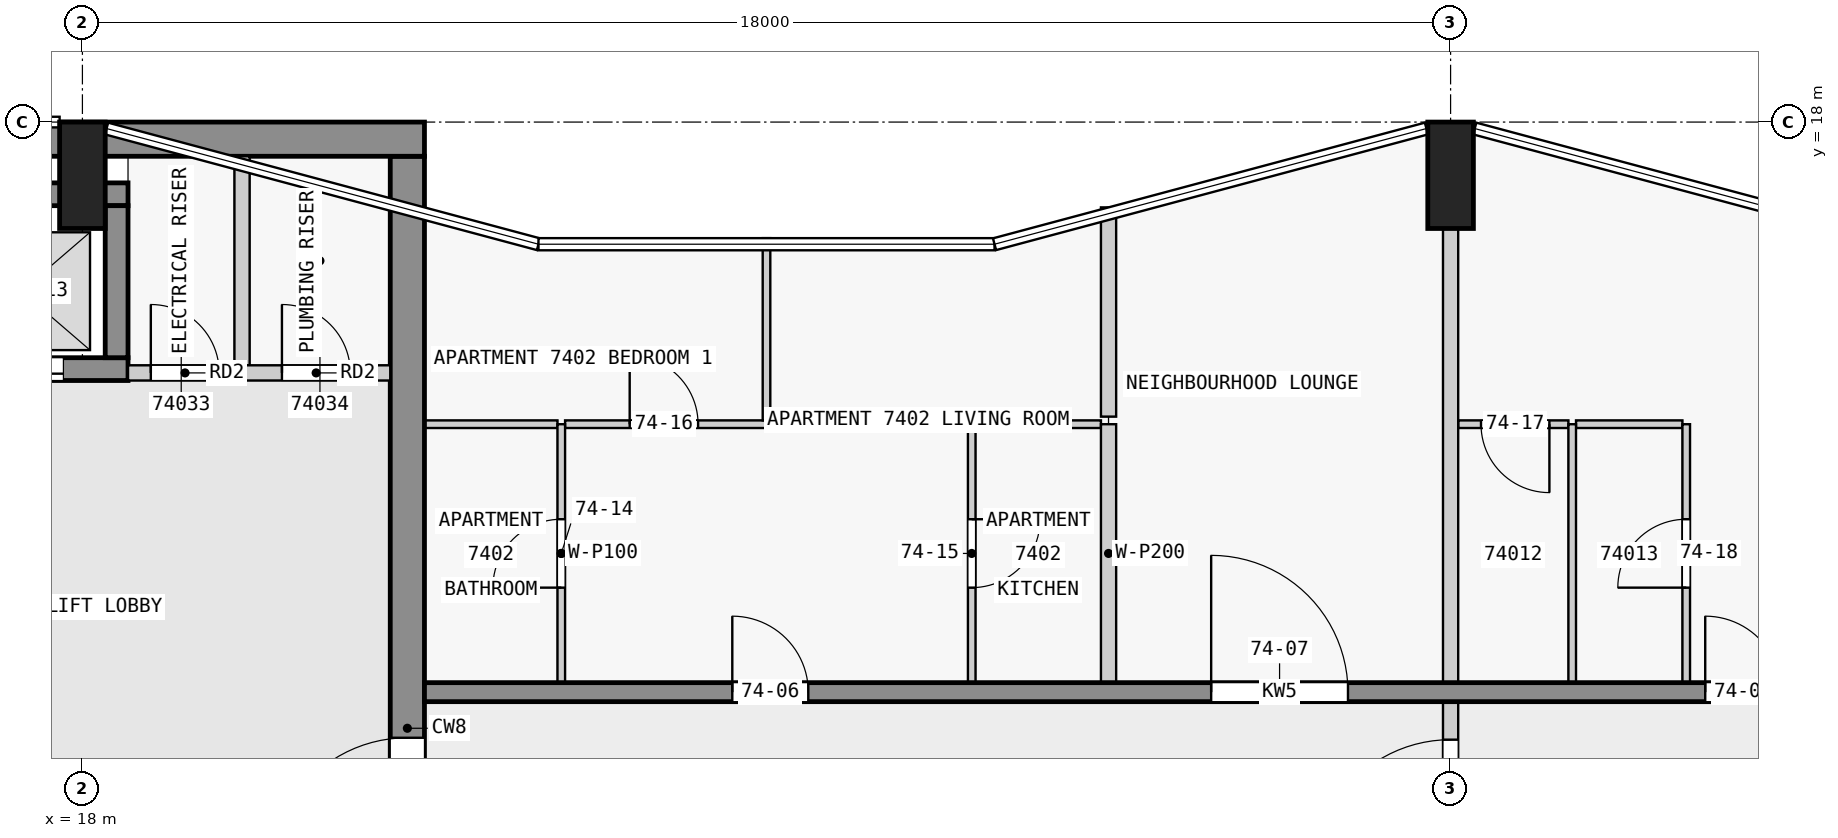
"""IFC4 building model, lengths in metres.
Left out: names, types, materials, properties, quantities, classifications, styles, units other than length and angle.
Written with IfcOpenShell. Run it as: python <this file> out.ifc"""

import sys

from ifc_helpers import new_model, si_unit, direction, frame, frame_2d, origin, origin_2d, place, context, subcontext, project, spatial, rectangle, extrude, element, fill, save


model = new_model("IFC4")
c1 = context("Model", 3, precision=1e-05, world=origin(), true_north=direction((0.0, 1.0)))
c2 = subcontext(c1, "Body", "Model", "MODEL_VIEW")
j1 = project(units=[si_unit("LENGTHUNIT", "METRE"), si_unit("PLANEANGLEUNIT", "RADIAN")], contexts=[c1])
p1 = place(None, origin())
s1 = spatial("IfcSite", under=j1, at=p1, CompositionType="ELEMENT")
p2 = place(p1, origin())
s2 = spatial("IfcBuilding", under=s1, at=p2, CompositionType="ELEMENT")
p3 = place(p2, frame((0.0, 0.0, 280.9)))
s3 = spatial("IfcBuildingStorey", under=s2, at=p3, CompositionType="ELEMENT", Elevation=280.9)
for number, where, z_axis, x_axis in (
    (1, (36.0, 17.3, 0.0), (0.0, 0.0, 1.0), (1.0, 0.0, 0.0)),
    (2, (18.0, 17.3, 0.0), (0.0, 0.0, 1.0), (1.0, 0.0, 0.0)),
):
    element("IfcColumn", number, at=place(p3, frame(where, z_axis=z_axis, x_axis=x_axis)), inside=s3, PredefinedType="COLUMN", context=c2, shape_type="SweptSolid", body=[
        extrude(rectangle(XDim=0.6, YDim=1.4, at=origin_2d()), origin(), (0.0, 0.0, 1.0), 3.5),
    ])
p4 = place(p3, frame((1.85, 17.775, 0.0), z_axis=(0.0, 0.0, 1.0), x_axis=(1.0, 0.0, 0.0)))
e3 = element("IfcWall", 3, at=p4, inside=s3, PredefinedType="SHEAR", context=c2, shape_type="SweptSolid", body=[
    extrude(rectangle(XDim=20.65, YDim=0.45, at=frame_2d((10.325, 0.0))), origin(), (0.0, 0.0, 1.0), 3.25),
])
p5 = place(p3, frame((22.275, 2.5, 0.0), z_axis=(0.0, 0.0, 1.0), x_axis=(0.0, 1.0, 0.0)))
e4 = element("IfcWall", 4, at=p5, inside=s3, PredefinedType="SHEAR", context=c2, shape_type="SweptSolid", body=[
    extrude(rectangle(XDim=15.05, YDim=0.45, at=frame_2d((7.525, 0.0))), origin(), (0.0, 0.0, 1.0), 3.25),
])
p6 = place(p5, frame((5.6, 0.0, 0.0)))
e5 = element("IfcOpeningElement", 5, at=p6, cuts=e4, PredefinedType="OPENING", context=c2, shape_type="SweptSolid", body=[
    extrude(rectangle(XDim=1.8, YDim=2.1, at=frame_2d((0.9, 1.05))), frame((0.0, 0.235, 0.0), z_axis=(0.0, -1.0, 0.0), x_axis=(1.0, 0.0, 0.0)), (0.0, 0.0, 1.0), 0.47),
])
p7 = place(p3, frame((10.8, 17.05, 0.0), z_axis=(0.0, 0.0, 1.0), x_axis=(1.0, 0.0, 0.0)))
e6 = element("IfcWall", 6, at=p7, inside=s3, PredefinedType="SHEAR", context=c2, shape_type="SweptSolid", body=[
    extrude(rectangle(XDim=7.8, YDim=0.3, at=frame_2d((3.9, 0.0))), origin(), (0.0, 0.0, 1.0), 3.25),
])
p8 = place(p3, frame((10.8, 14.75, 0.0), z_axis=(0.0, 0.0, 1.0), x_axis=(1.0, 0.0, 0.0)))
e7 = element("IfcWall", 7, at=p8, inside=s3, PredefinedType="SHEAR", context=c2, shape_type="SweptSolid", body=[
    extrude(rectangle(XDim=7.8, YDim=0.3, at=frame_2d((3.9, 0.0))), origin(), (0.0, 0.0, 1.0), 3.25),
])
p9 = place(p8, frame((0.85, 0.0, 0.0)))
e8 = element("IfcOpeningElement", 8, at=p9, cuts=e7, PredefinedType="OPENING", context=c2, shape_type="SweptSolid", body=[
    extrude(rectangle(XDim=1.1, YDim=2.1, at=frame_2d((0.55, 1.05))), frame((0.0, 0.16, 0.0), z_axis=(0.0, -1.0, 0.0), x_axis=(1.0, 0.0, 0.0)), (0.0, 0.0, 1.0), 0.32),
])
p10 = place(p8, frame((3.35, 0.0, 0.0)))
e9 = element("IfcOpeningElement", 9, at=p10, cuts=e7, PredefinedType="OPENING", context=c2, shape_type="SweptSolid", body=[
    extrude(rectangle(XDim=1.1, YDim=2.1, at=frame_2d((0.55, 1.05))), frame((0.0, 0.16, 0.0), z_axis=(0.0, -1.0, 0.0), x_axis=(1.0, 0.0, 0.0)), (0.0, 0.0, 1.0), 0.32),
])
p11 = place(p8, frame((5.85, 0.0, 0.0)))
e10 = element("IfcOpeningElement", 10, at=p11, cuts=e7, PredefinedType="OPENING", context=c2, shape_type="SweptSolid", body=[
    extrude(rectangle(XDim=1.1, YDim=2.1, at=frame_2d((0.55, 1.05))), frame((0.0, 0.16, 0.0), z_axis=(0.0, -1.0, 0.0), x_axis=(1.0, 0.0, 0.0)), (0.0, 0.0, 1.0), 0.32),
])
p12 = place(p3, frame((18.45, 14.9, 0.0), z_axis=(0.0, 0.0, 1.0), x_axis=(0.0, 1.0, 0.0)))
e11 = element("IfcWall", 11, at=p12, inside=s3, PredefinedType="SHEAR", context=c2, shape_type="SweptSolid", body=[
    extrude(rectangle(XDim=2.0, YDim=0.3, at=frame_2d((1.0, 0.0))), origin(), (0.0, 0.0, 1.0), 3.25),
])
p13 = place(p3, frame((22.5, 10.5, 0.0), z_axis=(0.0, 0.0, 1.0), x_axis=(1.0, 0.0, 0.0)))
e12 = element("IfcWall", 12, at=p13, inside=s3, PredefinedType="SHEAR", context=c2, shape_type="SweptSolid", body=[
    extrude(rectangle(XDim=22.5, YDim=0.25, at=frame_2d((11.25, 0.0))), origin(), (0.0, 0.0, 1.0), 3.25),
])
p14 = place(p13, frame((4.05, 0.0, 0.0)))
e13 = element("IfcOpeningElement", 13, at=p14, cuts=e12, PredefinedType="OPENING", context=c2, shape_type="SweptSolid", body=[
    extrude(rectangle(XDim=1.0, YDim=2.1, at=frame_2d((0.5, 1.05))), frame((0.0, 0.135, 0.0), z_axis=(0.0, -1.0, 0.0), x_axis=(1.0, 0.0, 0.0)), (0.0, 0.0, 1.0), 0.27),
])
p15 = place(p13, frame((10.35, 0.0, 0.0)))
e14 = element("IfcOpeningElement", 14, at=p15, cuts=e12, PredefinedType="OPENING", context=c2, shape_type="SweptSolid", body=[
    extrude(rectangle(XDim=1.8, YDim=2.1, at=frame_2d((0.9, 1.05))), frame((0.0, 0.135, 0.0), z_axis=(0.0, -1.0, 0.0), x_axis=(1.0, 0.0, 0.0)), (0.0, 0.0, 1.0), 0.27),
])
p16 = place(p13, frame((16.85, 0.0, 0.0)))
e15 = element("IfcOpeningElement", 15, at=p16, cuts=e12, PredefinedType="OPENING", context=c2, shape_type="SweptSolid", body=[
    extrude(rectangle(XDim=1.0, YDim=2.1, at=frame_2d((0.5, 1.05))), frame((0.0, 0.135, 0.0), z_axis=(0.0, -1.0, 0.0), x_axis=(1.0, 0.0, 0.0)), (0.0, 0.0, 1.0), 0.27),
])
p17 = place(p3, frame((18.6, 14.7, 0.0), z_axis=(0.0, 0.0, 1.0), x_axis=(1.0, 0.0, 0.0)))
e16 = element("IfcWall", 16, at=p17, inside=s3, PredefinedType="PARTITIONING", context=c2, shape_type="SweptSolid", body=[
    extrude(rectangle(XDim=3.45, YDim=0.2, at=frame_2d((1.725, 0.0))), origin(), (0.0, 0.0, 1.0), 3.25),
])
p18 = place(p17, frame((0.3, 0.0, 0.0)))
e17 = element("IfcOpeningElement", 17, at=p18, cuts=e16, PredefinedType="OPENING", context=c2, shape_type="SweptSolid", body=[
    extrude(rectangle(XDim=0.9, YDim=2.1, at=frame_2d((0.45, 1.05))), frame((0.0, 0.11, 0.0), z_axis=(0.0, -1.0, 0.0), x_axis=(1.0, 0.0, 0.0)), (0.0, 0.0, 1.0), 0.22),
])
p19 = place(p17, frame((2.025, 0.0, 0.0)))
e18 = element("IfcOpeningElement", 18, at=p19, cuts=e16, PredefinedType="OPENING", context=c2, shape_type="SweptSolid", body=[
    extrude(rectangle(XDim=0.9, YDim=2.1, at=frame_2d((0.45, 1.05))), frame((0.0, 0.11, 0.0), z_axis=(0.0, -1.0, 0.0), x_axis=(1.0, 0.0, 0.0)), (0.0, 0.0, 1.0), 0.22),
])
p20 = place(p3, frame((20.1, 14.8, 0.0), z_axis=(0.0, 0.0, 1.0), x_axis=(0.0, 1.0, 0.0)))
e19 = element("IfcWall", 19, at=p20, inside=s3, PredefinedType="PARTITIONING", context=c2, shape_type="SweptSolid", body=[
    extrude(rectangle(XDim=2.75, YDim=0.2, at=frame_2d((1.375, 0.0))), origin(), (0.0, 0.0, 1.0), 3.25),
])
p21 = place(p3, frame((24.25, 14.025, 0.0), z_axis=(0.0, 0.0, 1.0), x_axis=(-1.0, 0.0, 0.0)))
e20 = element("IfcWall", 20, at=p21, inside=s3, PredefinedType="PARTITIONING", context=c2, shape_type="SweptSolid", body=[
    extrude(rectangle(XDim=1.75, YDim=0.1, at=frame_2d((0.875, 0.0))), origin(), (0.0, 0.0, 1.0), 3.25),
])
p22 = place(p3, frame((31.4, 14.025, 0.0), z_axis=(0.0, 0.0, 1.0), x_axis=(-1.0, 0.0, 0.0)))
e21 = element("IfcWall", 21, at=p22, inside=s3, PredefinedType="PARTITIONING", context=c2, shape_type="SweptSolid", body=[
    extrude(rectangle(XDim=1.65, YDim=0.1, at=frame_2d((0.825, 0.0))), origin(), (0.0, 0.0, 1.0), 3.25),
])
p23 = place(p3, frame((37.55, 14.025, 0.0), z_axis=(0.0, 0.0, 1.0), x_axis=(-1.0, 0.0, 0.0)))
e22 = element("IfcWall", 22, at=p23, inside=s3, PredefinedType="PARTITIONING", context=c2, shape_type="SweptSolid", body=[
    extrude(rectangle(XDim=1.45, YDim=0.1, at=frame_2d((0.725, 0.0))), origin(), (0.0, 0.0, 1.0), 3.25),
])
p24 = place(p23, frame((0.25, 0.0, 0.0)))
e23 = element("IfcOpeningElement", 23, at=p24, cuts=e22, PredefinedType="OPENING", context=c2, shape_type="SweptSolid", body=[
    extrude(rectangle(XDim=0.9, YDim=2.1, at=frame_2d((0.45, 1.05))), frame((0.0, 0.06, 0.0), z_axis=(0.0, -1.0, 0.0), x_axis=(1.0, 0.0, 0.0)), (0.0, 0.0, 1.0), 0.12),
])
p25 = place(p3, frame((39.05, 14.025, 0.0), z_axis=(0.0, 0.0, 1.0), x_axis=(-1.0, 0.0, 0.0)))
e24 = element("IfcWall", 24, at=p25, inside=s3, PredefinedType="PARTITIONING", context=c2, shape_type="SweptSolid", body=[
    extrude(rectangle(XDim=1.4, YDim=0.1, at=frame_2d((0.7, 0.0))), origin(), (0.0, 0.0, 1.0), 3.25),
])
p26 = place(p3, frame((24.35, 14.025, 0.0), z_axis=(0.0, 0.0, 1.0), x_axis=(1.0, 0.0, 0.0)))
e25 = element("IfcWall", 25, at=p26, inside=s3, PredefinedType="PARTITIONING", context=c2, shape_type="SweptSolid", body=[
    extrude(rectangle(XDim=2.65, YDim=0.1, at=frame_2d((1.325, 0.0))), origin(), (0.0, 0.0, 1.0), 3.25),
])
p27 = place(p26, frame((0.85, 0.0, 0.0)))
e26 = element("IfcOpeningElement", 26, at=p27, cuts=e25, PredefinedType="OPENING", context=c2, shape_type="SweptSolid", body=[
    extrude(rectangle(XDim=0.9, YDim=2.1, at=frame_2d((0.45, 1.05))), frame((0.0, 0.06, 0.0), z_axis=(0.0, -1.0, 0.0), x_axis=(1.0, 0.0, 0.0)), (0.0, 0.0, 1.0), 0.12),
])
p28 = place(p3, frame((24.3, 10.625, 0.0), z_axis=(0.0, 0.0, 1.0), x_axis=(0.0, 1.0, 0.0)))
e27 = element("IfcWall", 27, at=p28, inside=s3, PredefinedType="PARTITIONING", context=c2, shape_type="SweptSolid", body=[
    extrude(rectangle(XDim=3.4, YDim=0.1, at=frame_2d((1.7, 0.0))), origin(), (0.0, 0.0, 1.0), 3.25),
])
p29 = place(p28, frame((1.25, 0.0, 0.0)))
e28 = element("IfcOpeningElement", 28, at=p29, cuts=e27, PredefinedType="OPENING", context=c2, shape_type="SweptSolid", body=[
    extrude(rectangle(XDim=0.9, YDim=2.1, at=frame_2d((0.45, 1.05))), frame((0.0, 0.06, 0.0), z_axis=(0.0, -1.0, 0.0), x_axis=(1.0, 0.0, 0.0)), (0.0, 0.0, 1.0), 0.12),
])
p30 = place(p3, frame((27.0, 14.075, 0.0), z_axis=(0.0, 0.0, 1.0), x_axis=(0.0, 1.0, 0.0)))
e29 = element("IfcWall", 29, at=p30, inside=s3, PredefinedType="PARTITIONING", context=c2, shape_type="SweptSolid", body=[
    extrude(rectangle(XDim=2.398, YDim=0.1, at=frame_2d((1.199, 0.0))), origin(), (0.0, 0.0, 1.0), 3.25),
])
p31 = place(p3, frame((29.7, 14.025, 0.0), z_axis=(0.0, 0.0, 1.0), x_axis=(0.0, -1.0, 0.0)))
e30 = element("IfcWall", 30, at=p31, inside=s3, PredefinedType="PARTITIONING", context=c2, shape_type="SweptSolid", body=[
    extrude(rectangle(XDim=3.4, YDim=0.1, at=frame_2d((1.7, 0.0))), origin(), (0.0, 0.0, 1.0), 3.25),
])
p32 = place(p31, frame((1.25, 0.0, 0.0)))
e31 = element("IfcOpeningElement", 31, at=p32, cuts=e30, PredefinedType="OPENING", context=c2, shape_type="SweptSolid", body=[
    extrude(rectangle(XDim=0.9, YDim=2.1, at=frame_2d((0.45, 1.05))), frame((0.0, 0.06, 0.0), z_axis=(0.0, -1.0, 0.0), x_axis=(1.0, 0.0, 0.0)), (0.0, 0.0, 1.0), 0.12),
])
p33 = place(p3, frame((31.5, 16.878, 0.0), z_axis=(0.0, 0.0, 1.0), x_axis=(0.0, -1.0, 0.0)))
e32 = element("IfcWall", 32, at=p33, inside=s3, PredefinedType="PARTITIONING", context=c2, shape_type="SweptSolid", body=[
    extrude(rectangle(XDim=2.753, YDim=0.2, at=frame_2d((1.376, 0.0))), origin(), (0.0, 0.0, 1.0), 3.25),
])
p34 = place(p3, frame((31.5, 10.625, 0.0), z_axis=(0.0, 0.0, 1.0), x_axis=(0.0, 1.0, 0.0)))
e33 = element("IfcWall", 33, at=p34, inside=s3, PredefinedType="PARTITIONING", context=c2, shape_type="SweptSolid", body=[
    extrude(rectangle(XDim=3.4, YDim=0.2, at=frame_2d((1.7, 0.0))), origin(), (0.0, 0.0, 1.0), 3.25),
])
p35 = place(p3, frame((36.0, 10.625, 0.0), z_axis=(0.0, 0.0, 1.0), x_axis=(0.0, 1.0, 0.0)))
e34 = element("IfcWall", 34, at=p35, inside=s3, PredefinedType="PARTITIONING", context=c2, shape_type="SweptSolid", body=[
    extrude(rectangle(XDim=5.975, YDim=0.2, at=frame_2d((2.988, 0.0))), origin(), (0.0, 0.0, 1.0), 3.25),
])
p36 = place(p3, frame((37.6, 10.625, 0.0), z_axis=(0.0, 0.0, 1.0), x_axis=(0.0, 1.0, 0.0)))
e35 = element("IfcWall", 35, at=p36, inside=s3, PredefinedType="PARTITIONING", context=c2, shape_type="SweptSolid", body=[
    extrude(rectangle(XDim=3.4, YDim=0.1, at=frame_2d((1.7, 0.0))), origin(), (0.0, 0.0, 1.0), 3.25),
])
p37 = place(p3, frame((39.1, 10.625, 0.0), z_axis=(0.0, 0.0, 1.0), x_axis=(0.0, 1.0, 0.0)))
e36 = element("IfcWall", 36, at=p37, inside=s3, PredefinedType="PARTITIONING", context=c2, shape_type="SweptSolid", body=[
    extrude(rectangle(XDim=3.4, YDim=0.1, at=frame_2d((1.7, 0.0))), origin(), (0.0, 0.0, 1.0), 3.25),
])
p38 = place(p37, frame((1.25, 0.0, 0.0)))
e37 = element("IfcOpeningElement", 37, at=p38, cuts=e36, PredefinedType="OPENING", context=c2, shape_type="SweptSolid", body=[
    extrude(rectangle(XDim=0.9, YDim=2.1, at=frame_2d((0.45, 1.05))), frame((0.0, 0.06, 0.0), z_axis=(0.0, -1.0, 0.0), x_axis=(1.0, 0.0, 0.0)), (0.0, 0.0, 1.0), 0.12),
])
p39 = place(p3, frame((36.0, 7.475, 0.0), z_axis=(0.0, 0.0, 1.0), x_axis=(0.0, 1.0, 0.0)))
e38 = element("IfcWall", 38, at=p39, inside=s3, PredefinedType="PARTITIONING", context=c2, shape_type="SweptSolid", body=[
    extrude(rectangle(XDim=3.05, YDim=0.2, at=frame_2d((1.525, 0.0))), origin(), (0.0, 0.0, 1.0), 3.25),
])
p40 = place(p39, frame((0.6, 0.0, 0.0)))
e39 = element("IfcOpeningElement", 39, at=p40, cuts=e38, PredefinedType="OPENING", context=c2, shape_type="SweptSolid", body=[
    extrude(rectangle(XDim=1.8, YDim=2.1, at=frame_2d((0.9, 1.05))), frame((0.0, 0.11, 0.0), z_axis=(0.0, -1.0, 0.0), x_axis=(1.0, 0.0, 0.0)), (0.0, 0.0, 1.0), 0.22),
])
p41 = place(p11, origin())
e40 = element("IfcDoor", 40, at=p41, inside=s3, OperationType="DOUBLE_DOOR_SLIDING", PredefinedType="DOOR", context=c2, shape_type="SweptSolid", body=[
    extrude(rectangle(XDim=1.1, YDim=2.1, at=frame_2d((0.55, 1.05))), frame((0.0, 0.025, 0.0), z_axis=(0.0, -1.0, 0.0), x_axis=(1.0, 0.0, 0.0)), (0.0, 0.0, 1.0), 0.05),
])
fill(e10, e40)
p42 = place(p6, origin())
e41 = element("IfcDoor", 41, at=p42, inside=s3, OperationType="DOUBLE_DOOR_SINGLE_SWING", PredefinedType="DOOR", context=c2, shape_type="SweptSolid", body=[
    extrude(rectangle(XDim=1.8, YDim=2.1, at=frame_2d((0.9, 1.05))), frame((0.0, 0.025, 0.0), z_axis=(0.0, -1.0, 0.0), x_axis=(1.0, 0.0, 0.0)), (0.0, 0.0, 1.0), 0.05),
])
fill(e5, e41)
p43 = place(p18, origin())
e42 = element("IfcDoor", 42, at=p43, inside=s3, OperationType="SINGLE_SWING_LEFT", PredefinedType="DOOR", context=c2, shape_type="SweptSolid", body=[
    extrude(rectangle(XDim=0.9, YDim=2.1, at=frame_2d((0.45, 1.05))), frame((0.0, 0.025, 0.0), z_axis=(0.0, -1.0, 0.0), x_axis=(1.0, 0.0, 0.0)), (0.0, 0.0, 1.0), 0.05),
])
fill(e17, e42)
p44 = place(p19, origin())
e43 = element("IfcDoor", 43, at=p44, inside=s3, OperationType="SINGLE_SWING_LEFT", PredefinedType="DOOR", context=c2, shape_type="SweptSolid", body=[
    extrude(rectangle(XDim=0.9, YDim=2.1, at=frame_2d((0.45, 1.05))), frame((0.0, 0.025, 0.0), z_axis=(0.0, -1.0, 0.0), x_axis=(1.0, 0.0, 0.0)), (0.0, 0.0, 1.0), 0.05),
])
fill(e18, e43)
p45 = place(p14, origin())
e44 = element("IfcDoor", 44, at=p45, inside=s3, OperationType="SINGLE_SWING_LEFT", PredefinedType="DOOR", context=c2, shape_type="SweptSolid", body=[
    extrude(rectangle(XDim=1.0, YDim=2.1, at=frame_2d((0.5, 1.05))), frame((0.0, 0.025, 0.0), z_axis=(0.0, -1.0, 0.0), x_axis=(1.0, 0.0, 0.0)), (0.0, 0.0, 1.0), 0.05),
])
fill(e13, e44)
p46 = place(p15, origin())
e45 = element("IfcDoor", 45, at=p46, inside=s3, OperationType="SINGLE_SWING_LEFT", PredefinedType="DOOR", context=c2, shape_type="SweptSolid", body=[
    extrude(rectangle(XDim=1.8, YDim=2.1, at=frame_2d((0.9, 1.05))), frame((0.0, 0.025, 0.0), z_axis=(0.0, -1.0, 0.0), x_axis=(1.0, 0.0, 0.0)), (0.0, 0.0, 1.0), 0.05),
])
fill(e14, e45)
p47 = place(p16, origin())
e46 = element("IfcDoor", 46, at=p47, inside=s3, OperationType="SINGLE_SWING_RIGHT", PredefinedType="DOOR", context=c2, shape_type="SweptSolid", body=[
    extrude(rectangle(XDim=1.0, YDim=2.1, at=frame_2d((0.5, 1.05))), frame((0.0, 0.025, 0.0), z_axis=(0.0, -1.0, 0.0), x_axis=(1.0, 0.0, 0.0)), (0.0, 0.0, 1.0), 0.05),
])
fill(e15, e46)
p48 = place(p40, origin())
e47 = element("IfcDoor", 47, at=p48, inside=s3, OperationType="SINGLE_SWING_LEFT", PredefinedType="DOOR", context=c2, shape_type="SweptSolid", body=[
    extrude(rectangle(XDim=1.8, YDim=2.1, at=frame_2d((0.9, 1.05))), frame((0.0, 0.025, 0.0), z_axis=(0.0, -1.0, 0.0), x_axis=(1.0, 0.0, 0.0)), (0.0, 0.0, 1.0), 0.05),
])
fill(e39, e47)
p49 = place(p29, origin())
e48 = element("IfcDoor", 48, at=p49, inside=s3, OperationType="SINGLE_SWING_LEFT", PredefinedType="DOOR", context=c2, shape_type="SweptSolid", body=[
    extrude(rectangle(XDim=0.9, YDim=2.1, at=frame_2d((0.45, 1.05))), frame((0.0, 0.025, 0.0), z_axis=(0.0, -1.0, 0.0), x_axis=(1.0, 0.0, 0.0)), (0.0, 0.0, 1.0), 0.05),
])
fill(e28, e48)
p50 = place(p32, origin())
e49 = element("IfcDoor", 49, at=p50, inside=s3, OperationType="SINGLE_SWING_LEFT", PredefinedType="DOOR", context=c2, shape_type="SweptSolid", body=[
    extrude(rectangle(XDim=0.9, YDim=2.1, at=frame_2d((0.45, 1.05))), frame((0.0, 0.025, 0.0), z_axis=(0.0, -1.0, 0.0), x_axis=(1.0, 0.0, 0.0)), (0.0, 0.0, 1.0), 0.05),
])
fill(e31, e49)
p51 = place(p27, origin())
e50 = element("IfcDoor", 50, at=p51, inside=s3, OperationType="SINGLE_SWING_LEFT", PredefinedType="DOOR", context=c2, shape_type="SweptSolid", body=[
    extrude(rectangle(XDim=0.9, YDim=2.1, at=frame_2d((0.45, 1.05))), frame((0.0, 0.025, 0.0), z_axis=(0.0, -1.0, 0.0), x_axis=(1.0, 0.0, 0.0)), (0.0, 0.0, 1.0), 0.05),
])
fill(e26, e50)
p52 = place(p24, origin())
e51 = element("IfcDoor", 51, at=p52, inside=s3, OperationType="SINGLE_SWING_LEFT", PredefinedType="DOOR", context=c2, shape_type="SweptSolid", body=[
    extrude(rectangle(XDim=0.9, YDim=2.1, at=frame_2d((0.45, 1.05))), frame((0.0, 0.025, 0.0), z_axis=(0.0, -1.0, 0.0), x_axis=(1.0, 0.0, 0.0)), (0.0, 0.0, 1.0), 0.05),
])
fill(e23, e51)
p53 = place(p38, origin())
e52 = element("IfcDoor", 52, at=p53, inside=s3, OperationType="SINGLE_SWING_LEFT", PredefinedType="DOOR", context=c2, shape_type="SweptSolid", body=[
    extrude(rectangle(XDim=0.9, YDim=2.1, at=frame_2d((0.45, 1.05))), frame((0.0, 0.025, 0.0), z_axis=(0.0, -1.0, 0.0), x_axis=(1.0, 0.0, 0.0)), (0.0, 0.0, 1.0), 0.05),
])
fill(e37, e52)
save(model, sys.argv[1])
